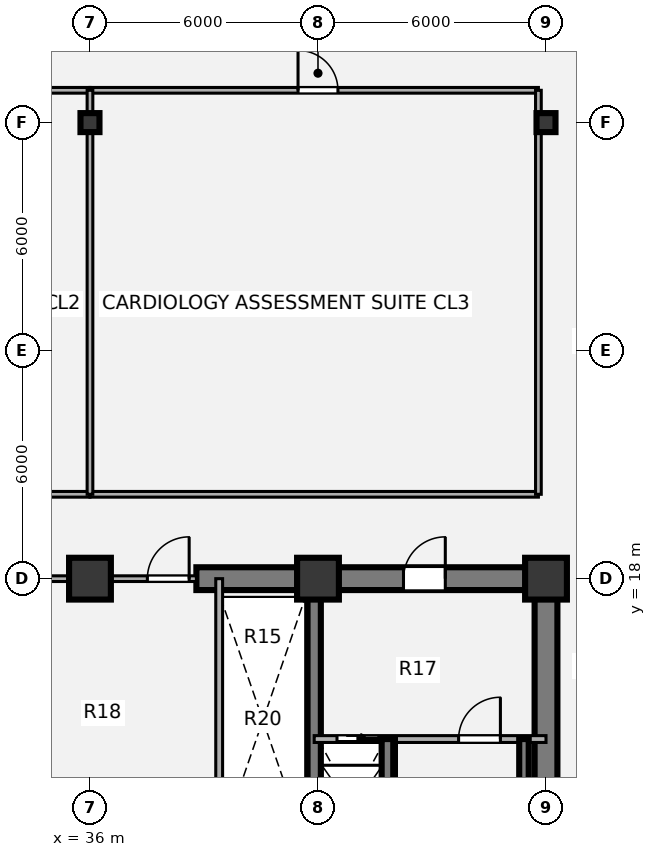
"""IFC4 building model, lengths in metres.
Left out: names, types, materials, properties, quantities, classifications, styles, units other than length and angle.
Written with IfcOpenShell. Run it as: python <this file> out.ifc"""

import sys

from ifc_helpers import new_model, si_unit, direction, frame, frame_2d, origin, origin_2d, place, context, subcontext, project, spatial, rectangle, i_section, extrude, source, transform, mapped, element, fill, save


model = new_model("IFC4")
c1 = context("Model", 3, precision=1e-05, world=origin(), true_north=direction((0.0, 1.0)))
c2 = subcontext(c1, "Body", "Model", "MODEL_VIEW")
j1 = project(units=[si_unit("LENGTHUNIT", "METRE"), si_unit("PLANEANGLEUNIT", "RADIAN")], contexts=[c1])
p1 = place(None, origin())
s1 = spatial("IfcSite", under=j1, at=p1, CompositionType="ELEMENT")
p2 = place(p1, origin())
s2 = spatial("IfcBuilding", under=s1, at=p2, CompositionType="ELEMENT")
p3 = place(p2, frame((0.0, 0.0, 9.72)))
s3 = spatial("IfcBuildingStorey", under=s2, at=p3, CompositionType="ELEMENT", Elevation=9.72)
m1 = source(origin(), c2, "Body", "SweptSolid", [
    extrude(rectangle(XDim=1.1, YDim=1.1, at=origin_2d()), origin(), (0.0, 0.0, 1.0), 4.32),
])
for number, where, z_axis, x_axis in (
    (1, (36.0, 18.0, 0.0), (0.0, 0.0, 1.0), (1.0, 0.0, 0.0)),
    (2, (42.0, 18.0, 0.0), (0.0, 0.0, 1.0), (1.0, 0.0, 0.0)),
    (3, (48.0, 18.0, 0.0), (0.0, 0.0, 1.0), (1.0, 0.0, 0.0)),
):
    element("IfcColumn", number, at=place(p3, frame(where, z_axis=z_axis, x_axis=x_axis)), inside=s3, PredefinedType="COLUMN", context=c2, shape_type="MappedRepresentation", body=[
        mapped(m1, transform((0.0, 0.0, 0.0), x_axis=(1.0, 0.0, 0.0), y_axis=(0.0, 1.0, 0.0), z_axis=(0.0, 0.0, 1.0), scale=1.0)),
    ])
p4 = place(p3, frame((48.0, 18.0, 0.0), z_axis=(0.0, 0.0, 1.0), x_axis=(0.0, -1.0, 0.0)))
e4 = element("IfcWall", 4, at=p4, inside=s3, PredefinedType="SHEAR", context=c2, shape_type="SweptSolid", body=[
    extrude(rectangle(XDim=12.0, YDim=0.6, at=frame_2d((6.0, 0.0))), origin(), (0.0, 0.0, 1.0), 4.32),
])
p5 = place(p3, frame((38.8, 18.0, 0.0), z_axis=(0.0, 0.0, 1.0), x_axis=(1.0, 0.0, 0.0)))
e5 = element("IfcWall", 5, at=p5, inside=s3, PredefinedType="SHEAR", context=c2, shape_type="SweptSolid", body=[
    extrude(rectangle(XDim=9.5, YDim=0.6, at=frame_2d((4.75, 0.0))), origin(), (0.0, 0.0, 1.0), 4.32),
])
p6 = place(p5, frame((5.45, 0.0, 0.0)))
e6 = element("IfcOpeningElement", 6, at=p6, cuts=e5, PredefinedType="OPENING", context=c2, shape_type="SweptSolid", body=[
    extrude(rectangle(XDim=1.1, YDim=2.1, at=origin_2d()), frame((0.55, 0.31, 1.05), z_axis=(0.0, -1.0, 0.0), x_axis=(1.0, 0.0, 0.0)), (0.0, 0.0, 1.0), 0.62),
])
p7 = place(p3, frame((41.9, 18.0, 0.0), z_axis=(0.0, 0.0, 1.0), x_axis=(0.0, -1.0, 0.0)))
e7 = element("IfcWall", 7, at=p7, inside=s3, PredefinedType="SHEAR", context=c2, shape_type="SweptSolid", body=[
    extrude(rectangle(XDim=12.0, YDim=0.35, at=frame_2d((6.0, 0.0))), origin(), (0.0, 0.0, 1.0), 4.32),
])
p8 = place(p7, frame((10.08, 0.0, 0.0)))
e8 = element("IfcOpeningElement", 8, at=p8, cuts=e7, PredefinedType="OPENING", context=c2, shape_type="SweptSolid", body=[
    extrude(rectangle(XDim=1.3, YDim=2.1, at=origin_2d()), frame((0.65, 0.185, 1.05), z_axis=(0.0, -1.0, 0.0), x_axis=(1.0, 0.0, 0.0)), (0.0, 0.0, 1.0), 0.37),
])
m2 = source(origin(), c2, "Body", "SweptSolid", [
    extrude(i_section(OverallWidth=0.5, OverallDepth=0.5, WebThickness=0.022, FlangeThickness=0.035, at=origin_2d()), origin(), (0.0, 0.0, 1.0), 4.32),
])
for number, where, z_axis, x_axis in (
    (9, (36.0, 30.0, 0.0), (0.0, 0.0, 1.0), (1.0, 0.0, 0.0)),
    (10, (48.0, 30.0, 0.0), (0.0, 0.0, 1.0), (1.0, 0.0, 0.0)),
):
    element("IfcColumn", number, at=place(p3, frame(where, z_axis=z_axis, x_axis=x_axis)), inside=s3, PredefinedType="COLUMN", context=c2, shape_type="MappedRepresentation", body=[
        mapped(m2, transform((0.0, 0.0, 0.0), x_axis=(1.0, 0.0, 0.0), y_axis=(0.0, 1.0, 0.0), z_axis=(0.0, 0.0, 1.0), scale=1.0)),
    ])
p9 = place(p3, frame((39.4, 11.0, 0.0), z_axis=(0.0, 0.0, 1.0), x_axis=(0.0, 1.0, 0.0)))
e11 = element("IfcWall", 11, at=p9, inside=s3, PredefinedType="PARTITIONING", context=c2, shape_type="SweptSolid", body=[
    extrude(rectangle(XDim=7.0, YDim=0.18, at=frame_2d((3.5, 0.0))), origin(), (0.0, 0.0, 1.0), 4.01),
])
p10 = place(p3, frame((33.2, 18.0, 0.0), z_axis=(0.0, 0.0, 1.0), x_axis=(1.0, 0.0, 0.0)))
e12 = element("IfcWall", 12, at=p10, inside=s3, PredefinedType="PARTITIONING", context=c2, shape_type="SweptSolid", body=[
    extrude(rectangle(XDim=5.6, YDim=0.15, at=frame_2d((2.8, 0.0))), origin(), (0.0, 0.0, 1.0), 2.825),
])
p11 = place(p10, frame((0.19, 0.0, 0.0)))
e13 = element("IfcOpeningElement", 13, at=p11, cuts=e12, PredefinedType="OPENING", context=c2, shape_type="SweptSolid", body=[
    extrude(rectangle(XDim=1.1, YDim=2.1, at=origin_2d()), frame((0.55, 0.085, 1.05), z_axis=(0.0, -1.0, 0.0), x_axis=(1.0, 0.0, 0.0)), (0.0, 0.0, 1.0), 0.17),
])
p12 = place(p10, frame((4.31, 0.0, 0.0)))
e14 = element("IfcOpeningElement", 14, at=p12, cuts=e12, PredefinedType="OPENING", context=c2, shape_type="SweptSolid", body=[
    extrude(rectangle(XDim=1.1, YDim=2.1, at=origin_2d()), frame((0.55, 0.085, 1.05), z_axis=(0.0, -1.0, 0.0), x_axis=(1.0, 0.0, 0.0)), (0.0, 0.0, 1.0), 0.17),
])
p13 = place(p3, frame((41.9, 13.78, 0.0), z_axis=(0.0, 0.0, 1.0), x_axis=(1.0, 0.0, 0.0)))
e15 = element("IfcWall", 15, at=p13, inside=s3, PredefinedType="PARTITIONING", context=c2, shape_type="SweptSolid", body=[
    extrude(rectangle(XDim=6.1, YDim=0.18, at=frame_2d((3.05, 0.0))), origin(), (0.0, 0.0, 1.0), 4.01),
])
p14 = place(p13, frame((0.6, 0.0, 0.0)))
e16 = element("IfcOpeningElement", 16, at=p14, cuts=e15, PredefinedType="OPENING", context=c2, shape_type="SweptSolid", body=[
    extrude(rectangle(XDim=1.1, YDim=2.1, at=origin_2d()), frame((0.55, 0.1, 1.05), z_axis=(0.0, -1.0, 0.0), x_axis=(1.0, 0.0, 0.0)), (0.0, 0.0, 1.0), 0.2),
])
p15 = place(p13, frame((3.8, 0.0, 0.0)))
e17 = element("IfcOpeningElement", 17, at=p15, cuts=e15, PredefinedType="OPENING", context=c2, shape_type="SweptSolid", body=[
    extrude(rectangle(XDim=1.1, YDim=2.1, at=origin_2d()), frame((0.55, 0.1, 1.05), z_axis=(0.0, -1.0, 0.0), x_axis=(1.0, 0.0, 0.0)), (0.0, 0.0, 1.0), 0.2),
])
p16 = place(p3, frame((43.85, 6.0, 0.0), z_axis=(0.0, 0.0, 1.0), x_axis=(0.0, 1.0, 0.0)))
e18 = element("IfcWall", 18, at=p16, inside=s3, PredefinedType="SHEAR", context=c2, shape_type="SweptSolid", body=[
    extrude(rectangle(XDim=7.78, YDim=0.35, at=frame_2d((3.89, 0.0))), origin(), (0.0, 0.0, 1.0), 4.36),
])
p17 = place(p3, frame((47.42, 6.0, 0.0), z_axis=(0.0, 0.0, 1.0), x_axis=(0.0, 1.0, 0.0)))
e19 = element("IfcWall", 19, at=p17, inside=s3, PredefinedType="SHEAR", context=c2, shape_type="SweptSolid", body=[
    extrude(rectangle(XDim=7.78, YDim=0.25, at=frame_2d((3.89, 0.0))), origin(), (0.0, 0.0, 1.0), 4.36),
])
for number, where, z_axis, x_axis in (
    (20, (24.2, 20.22, 0.0), (0.0, 0.0, 1.0), (1.0, 0.0, 0.0)),
    (21, (36.0, 20.22, 0.0), (0.0, 0.0, 1.0), (1.0, 0.0, 0.0)),
):
    element("IfcWall", number, at=place(p3, frame(where, z_axis=z_axis, x_axis=x_axis)), inside=s3, PredefinedType="PARTITIONING", context=c2, shape_type="SweptSolid", body=[
        extrude(rectangle(XDim=11.8, YDim=0.15, at=frame_2d((5.9, 0.0))), origin(), (0.0, 0.0, 1.0), 4.01),
    ])
p18 = place(p3, frame((24.2, 30.85, 0.0), z_axis=(0.0, 0.0, 1.0), x_axis=(1.0, 0.0, 0.0)))
e22 = element("IfcWall", 22, at=p18, inside=s3, PredefinedType="PARTITIONING", context=c2, shape_type="SweptSolid", body=[
    extrude(rectangle(XDim=11.8, YDim=0.15, at=frame_2d((5.9, 0.0))), origin(), (0.0, 0.0, 1.0), 4.01),
])
p19 = place(p18, frame((5.275, 0.0, 0.0)))
e23 = element("IfcOpeningElement", 23, at=p19, cuts=e22, PredefinedType="OPENING", context=c2, shape_type="SweptSolid", body=[
    extrude(rectangle(XDim=1.05, YDim=2.1, at=origin_2d()), frame((0.525, 0.085, 1.05), z_axis=(0.0, -1.0, 0.0), x_axis=(1.0, 0.0, 0.0)), (0.0, 0.0, 1.0), 0.17),
])
p20 = place(p3, frame((36.0, 30.85, 0.0), z_axis=(0.0, 0.0, 1.0), x_axis=(1.0, 0.0, 0.0)))
e24 = element("IfcWall", 24, at=p20, inside=s3, PredefinedType="PARTITIONING", context=c2, shape_type="SweptSolid", body=[
    extrude(rectangle(XDim=11.8, YDim=0.15, at=frame_2d((5.9, 0.0))), origin(), (0.0, 0.0, 1.0), 4.01),
])
p21 = place(p20, frame((5.475, 0.0, 0.0)))
e25 = element("IfcOpeningElement", 25, at=p21, cuts=e24, PredefinedType="OPENING", context=c2, shape_type="SweptSolid", body=[
    extrude(rectangle(XDim=1.05, YDim=2.1, at=origin_2d()), frame((0.525, 0.085, 1.05), z_axis=(0.0, -1.0, 0.0), x_axis=(1.0, 0.0, 0.0)), (0.0, 0.0, 1.0), 0.17),
])
for number, where, z_axis, x_axis in (
    (26, (36.0, 20.22, 0.0), (0.0, 0.0, 1.0), (0.0, 1.0, 0.0)),
    (27, (47.8, 20.22, 0.0), (0.0, 0.0, 1.0), (0.0, 1.0, 0.0)),
):
    element("IfcWall", number, at=place(p3, frame(where, z_axis=z_axis, x_axis=x_axis)), inside=s3, PredefinedType="PARTITIONING", context=c2, shape_type="SweptSolid", body=[
        extrude(rectangle(XDim=10.63, YDim=0.15, at=frame_2d((5.315, 0.0))), origin(), (0.0, 0.0, 1.0), 3.225),
    ])
m3 = source(origin(), c2, "Body", "SweptSolid", [
    extrude(rectangle(XDim=1.1, YDim=2.1, at=origin_2d()), frame((0.55, 0.025, 1.05), z_axis=(0.0, -1.0, 0.0), x_axis=(1.0, 0.0, 0.0)), (0.0, 0.0, 1.0), 0.05),
])
p22 = place(p12, origin())
e28 = element("IfcDoor", 28, at=p22, inside=s3, OperationType="SINGLE_SWING_RIGHT", PredefinedType="DOOR", context=c2, shape_type="MappedRepresentation", body=[
    mapped(m3, transform((0.0, 0.0, 0.0), x_axis=(1.0, 0.0, 0.0), y_axis=(0.0, 1.0, 0.0), z_axis=(0.0, 0.0, 1.0), scale=1.0)),
])
fill(e14, e28)
m4 = source(origin(), c2, "Body", "SweptSolid", [
    extrude(rectangle(XDim=1.1, YDim=2.1, at=origin_2d()), frame((0.55, 0.025, 1.05), z_axis=(0.0, -1.0, 0.0), x_axis=(1.0, 0.0, 0.0)), (0.0, 0.0, 1.0), 0.05),
])
p23 = place(p14, origin())
e29 = element("IfcDoor", 29, at=p23, inside=s3, OperationType="SLIDING_TO_RIGHT", PredefinedType="DOOR", context=c2, shape_type="MappedRepresentation", body=[
    mapped(m4, transform((0.0, 0.0, 0.0), x_axis=(1.0, 0.0, 0.0), y_axis=(0.0, 1.0, 0.0), z_axis=(0.0, 0.0, 1.0), scale=1.0)),
])
fill(e16, e29)
m5 = source(origin(), c2, "Body", "SweptSolid", [
    extrude(rectangle(XDim=1.1, YDim=2.1, at=origin_2d()), frame((0.55, 0.025, 1.05), z_axis=(0.0, -1.0, 0.0), x_axis=(1.0, 0.0, 0.0)), (0.0, 0.0, 1.0), 0.05),
])
p24 = place(p15, origin())
e30 = element("IfcDoor", 30, at=p24, inside=s3, OperationType="SINGLE_SWING_RIGHT", PredefinedType="DOOR", context=c2, shape_type="MappedRepresentation", body=[
    mapped(m5, transform((0.0, 0.0, 0.0), x_axis=(1.0, 0.0, 0.0), y_axis=(0.0, 1.0, 0.0), z_axis=(0.0, 0.0, 1.0), scale=1.0)),
])
fill(e17, e30)
p25 = place(p6, origin())
e31 = element("IfcDoor", 31, at=p25, inside=s3, OperationType="SINGLE_SWING_RIGHT", PredefinedType="DOOR", context=c2, shape_type="MappedRepresentation", body=[
    mapped(m3, transform((0.0, 0.0, 0.0), x_axis=(1.0, 0.0, 0.0), y_axis=(0.0, 1.0, 0.0), z_axis=(0.0, 0.0, 1.0), scale=1.0)),
])
fill(e6, e31)
m6 = source(origin(), c2, "Body", "SweptSolid", [
    extrude(rectangle(XDim=1.05, YDim=2.1, at=origin_2d()), frame((0.525, 0.025, 1.05), z_axis=(0.0, -1.0, 0.0), x_axis=(1.0, 0.0, 0.0)), (0.0, 0.0, 1.0), 0.05),
])
p26 = place(p21, origin())
e32 = element("IfcDoor", 32, at=p26, inside=s3, OperationType="SINGLE_SWING_LEFT", PredefinedType="DOOR", context=c2, shape_type="MappedRepresentation", body=[
    mapped(m6, transform((0.0, 0.0, 0.0), x_axis=(1.0, 0.0, 0.0), y_axis=(0.0, 1.0, 0.0), z_axis=(0.0, 0.0, 1.0), scale=1.0)),
])
fill(e25, e32)
save(model, sys.argv[1])
